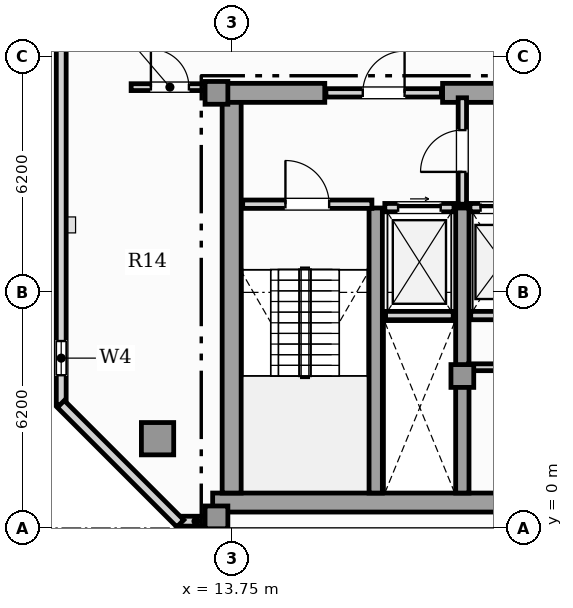
"""IFC4 building model, lengths in metres.
Left out: names, types, materials, properties, quantities, classifications, styles, units other than length and angle.
Written with IfcOpenShell. Run it as: python <this file> out.ifc"""

import sys

from ifc_helpers import new_model, si_unit, direction, frame, frame_2d, origin, origin_2d, place, context, subcontext, project, spatial, rectangle, hollow_rectangle, extrude, element, fill, save


model = new_model("IFC4")
c1 = context("Model", 3, precision=1e-05, world=origin(), true_north=direction((0.0, 1.0)))
c2 = subcontext(c1, "Body", "Model", "MODEL_VIEW")
j1 = project(units=[si_unit("LENGTHUNIT", "METRE"), si_unit("PLANEANGLEUNIT", "RADIAN")], contexts=[c1])
p1 = place(None, origin())
s1 = spatial("IfcSite", under=j1, at=p1, CompositionType="ELEMENT")
p2 = place(p1, origin())
s2 = spatial("IfcBuilding", under=s1, at=p2, CompositionType="ELEMENT")
p3 = place(p2, frame((0.0, 0.0, 324.6)))
s3 = spatial("IfcBuildingStorey", under=s2, at=p3, CompositionType="ELEMENT", Elevation=324.6)
p4 = place(p3, frame((13.25, 0.67, 0.0), z_axis=(0.0, 0.0, 1.0), x_axis=(1.0, 0.0, 0.0)))
e1 = element("IfcWall", 1, at=p4, inside=s3, PredefinedType="SHEAR", context=c2, shape_type="SweptSolid", body=[
    extrude(rectangle(XDim=31.0, YDim=0.5, at=frame_2d((15.5, 0.0))), origin(), (0.0, 0.0, 1.0), 3.65),
])
p5 = place(p3, frame((13.75, 0.92, 0.0), z_axis=(0.0, 0.0, 1.0), x_axis=(0.0, 1.0, 0.0)))
e2 = element("IfcWall", 2, at=p5, inside=s3, PredefinedType="SHEAR", context=c2, shape_type="SweptSolid", body=[
    extrude(rectangle(XDim=10.53, YDim=0.5, at=frame_2d((5.265, 0.0))), origin(), (0.0, 0.0, 1.0), 3.65),
])
p6 = place(p3, frame((13.25, 11.45, 0.0), z_axis=(0.0, 0.0, 1.0), x_axis=(1.0, 0.0, 0.0)))
e3 = element("IfcWall", 3, at=p6, inside=s3, PredefinedType="SHEAR", context=c2, shape_type="SweptSolid", body=[
    extrude(rectangle(XDim=2.95, YDim=0.5, at=frame_2d((1.475, 0.0))), origin(), (0.0, 0.0, 1.0), 3.65),
])
p7 = place(p3, frame((19.3, 11.45, 0.0), z_axis=(0.0, 0.0, 1.0), x_axis=(1.0, 0.0, 0.0)))
e4 = element("IfcWall", 4, at=p7, inside=s3, PredefinedType="SHEAR", context=c2, shape_type="SweptSolid", body=[
    extrude(rectangle(XDim=7.3, YDim=0.5, at=frame_2d((3.65, 0.0))), origin(), (0.0, 0.0, 1.0), 3.65),
])
for number, where, z_axis, x_axis in (
    (5, (17.54, 0.92, 0.0), (0.0, 0.0, 1.0), (0.0, 1.0, 0.0)),
    (6, (19.82, 0.92, 0.0), (0.0, 0.0, 1.0), (0.0, 1.0, 0.0)),
):
    element("IfcWall", number, at=place(p3, frame(where, z_axis=z_axis, x_axis=x_axis)), inside=s3, PredefinedType="SHEAR", context=c2, shape_type="SweptSolid", body=[
        extrude(rectangle(XDim=7.5, YDim=0.35, at=frame_2d((3.75, 0.0))), origin(), (0.0, 0.0, 1.0), 3.65),
    ])
for number, where, z_axis, x_axis in (
    (7, (13.35, 0.28, 0.0), (0.0, 0.0, 1.0), (1.0, 0.0, 0.0)),
    (8, (13.35, 11.45, 0.0), (0.0, 0.0, 1.0), (1.0, 0.0, 0.0)),
    (9, (19.82, 4.0, 0.0), (0.0, 0.0, 1.0), (1.0, 0.0, 0.0)),
):
    element("IfcColumn", number, at=place(p3, frame(where, z_axis=z_axis, x_axis=x_axis)), inside=s3, PredefinedType="COLUMN", context=c2, shape_type="SweptSolid", body=[
        extrude(rectangle(XDim=0.6, YDim=0.6, at=origin_2d()), origin(), (0.0, 0.0, 1.0), 3.85),
    ])
p8 = place(p3, frame((11.8, 2.35, 0.0), z_axis=(0.0, 0.0, 1.0), x_axis=(1.0, 0.0, 0.0)))
e10 = element("IfcColumn", 10, at=p8, inside=s3, PredefinedType="USERDEFINED", context=c2, shape_type="SweptSolid", body=[
    extrude(hollow_rectangle(XDim=0.85, YDim=0.85, WallThickness=0.05, at=origin_2d()), origin(), (0.0, 0.0, 1.0), 3.85),
])
p9 = place(p3, frame((12.375, 0.18, 0.0), z_axis=(0.0, 0.0, 1.0), x_axis=(1.0, 0.0, 0.0)))
e11 = element("IfcWall", 11, at=p9, inside=s3, PredefinedType="SOLIDWALL", context=c2, shape_type="SweptSolid", body=[
    extrude(rectangle(XDim=0.875, YDim=0.26, at=frame_2d((0.438, 0.0))), origin(), (0.0, 0.0, 1.0), 3.65),
])
p10 = place(p3, frame((9.265, 29.231, 0.0), z_axis=(0.0, 0.0, 1.0), x_axis=(0.0, -1.0, 0.0)))
e12 = element("IfcWall", 12, at=p10, inside=s3, PredefinedType="SOLIDWALL", context=c2, shape_type="SweptSolid", body=[
    extrude(rectangle(XDim=25.991, YDim=0.26, at=frame_2d((12.995, 0.0))), origin(), (0.0, 0.0, 1.0), 3.65),
])
p11 = place(p10, frame((24.311, 0.0, 0.95)))
e13 = element("IfcOpeningElement", 13, at=p11, cuts=e12, PredefinedType="OPENING", context=c2, shape_type="SweptSolid", body=[
    extrude(rectangle(XDim=0.9, YDim=1.5, at=frame_2d((0.45, 0.75))), frame((0.0, 0.14, 0.0), z_axis=(0.0, -1.0, 0.0), x_axis=(1.0, 0.0, 0.0)), (0.0, 0.0, 1.0), 0.28),
])
p12 = place(p10, frame((12.846, 0.0, 0.95)))
e14 = element("IfcOpeningElement", 14, at=p12, cuts=e12, PredefinedType="OPENING", context=c2, shape_type="SweptSolid", body=[
    extrude(rectangle(XDim=0.9, YDim=1.5, at=frame_2d((0.45, 0.75))), frame((0.0, 0.14, 0.0), z_axis=(0.0, -1.0, 0.0), x_axis=(1.0, 0.0, 0.0)), (0.0, 0.0, 1.0), 0.28),
])
p13 = place(p10, frame((10.978, 0.0, 0.95)))
e15 = element("IfcOpeningElement", 15, at=p13, cuts=e12, PredefinedType="OPENING", context=c2, shape_type="SweptSolid", body=[
    extrude(rectangle(XDim=0.9, YDim=1.5, at=frame_2d((0.45, 0.75))), frame((0.0, 0.14, 0.0), z_axis=(0.0, -1.0, 0.0), x_axis=(1.0, 0.0, 0.0)), (0.0, 0.0, 1.0), 0.28),
])
p14 = place(p10, frame((8.196, 0.0, 0.9)))
e16 = element("IfcOpeningElement", 16, at=p14, cuts=e12, PredefinedType="OPENING", context=c2, shape_type="SweptSolid", body=[
    extrude(rectangle(XDim=1.5, YDim=1.95, at=frame_2d((0.75, 0.975))), frame((0.0, 0.14, 0.0), z_axis=(0.0, -1.0, 0.0), x_axis=(1.0, 0.0, 0.0)), (0.0, 0.0, 1.0), 0.28),
])
p15 = place(p10, frame((5.138, 0.0, 0.9)))
e17 = element("IfcOpeningElement", 17, at=p15, cuts=e12, PredefinedType="OPENING", context=c2, shape_type="SweptSolid", body=[
    extrude(rectangle(XDim=1.5, YDim=1.95, at=frame_2d((0.75, 0.975))), frame((0.0, 0.14, 0.0), z_axis=(0.0, -1.0, 0.0), x_axis=(1.0, 0.0, 0.0)), (0.0, 0.0, 1.0), 0.28),
])
p16 = place(p10, frame((2.545, 0.0, 0.9)))
e18 = element("IfcOpeningElement", 18, at=p16, cuts=e12, PredefinedType="OPENING", context=c2, shape_type="SweptSolid", body=[
    extrude(rectangle(XDim=1.5, YDim=1.95, at=frame_2d((0.75, 0.975))), frame((0.0, 0.14, 0.0), z_axis=(0.0, -1.0, 0.0), x_axis=(1.0, 0.0, 0.0)), (0.0, 0.0, 1.0), 0.28),
])
p17 = place(p3, frame((9.255, 3.264, 0.0), z_axis=(0.0, 0.0, 1.0), x_axis=(0.707079321262, -0.707134240044, 0.0)))
e19 = element("IfcWall", 19, at=p17, inside=s3, PredefinedType="SOLIDWALL", context=c2, shape_type="SweptSolid", body=[
    extrude(rectangle(XDim=4.446, YDim=0.26, at=frame_2d((2.223, 0.0))), origin(), (0.0, 0.0, 1.0), 3.65),
])
p18 = place(p3, frame((17.8, 5.59, 0.0), z_axis=(0.0, 0.0, 1.0), x_axis=(1.0, 0.0, 0.0)))
e20 = element("IfcWall", 20, at=p18, inside=s3, PredefinedType="SOLIDWALL", context=c2, shape_type="SweptSolid", body=[
    extrude(rectangle(XDim=1.78, YDim=0.22, at=frame_2d((0.89, 0.0))), origin(), (0.0, 0.0, 1.0), 3.65),
])
p19 = place(p3, frame((17.78, 8.43, 0.0), z_axis=(0.0, 0.0, 1.0), x_axis=(1.0, 0.0, 0.0)))
e21 = element("IfcWall", 21, at=p19, inside=s3, PredefinedType="SOLIDWALL", context=c2, shape_type="SweptSolid", body=[
    extrude(rectangle(XDim=1.82, YDim=0.22, at=frame_2d((0.91, 0.0))), origin(), (0.0, 0.0, 1.0), 3.65),
])
p20 = place(p19, frame((0.35, 0.0, 0.0)))
e22 = element("IfcOpeningElement", 22, at=p20, cuts=e21, PredefinedType="OPENING", context=c2, shape_type="SweptSolid", body=[
    extrude(rectangle(XDim=1.12, YDim=2.25, at=frame_2d((0.56, 1.125))), frame((0.0, 0.12, 0.0), z_axis=(0.0, -1.0, 0.0), x_axis=(1.0, 0.0, 0.0)), (0.0, 0.0, 1.0), 0.24),
])
p21 = place(p3, frame((20.04, 5.59, 0.0), z_axis=(0.0, 0.0, 1.0), x_axis=(1.0, 0.0, 0.0)))
e23 = element("IfcWall", 23, at=p21, inside=s3, PredefinedType="SOLIDWALL", context=c2, shape_type="SweptSolid", body=[
    extrude(rectangle(XDim=1.7, YDim=0.22, at=frame_2d((0.85, 0.0))), origin(), (0.0, 0.0, 1.0), 3.65),
])
p22 = place(p3, frame((20.02, 8.43, 0.0), z_axis=(0.0, 0.0, 1.0), x_axis=(1.0, 0.0, 0.0)))
e24 = element("IfcWall", 24, at=p22, inside=s3, PredefinedType="SOLIDWALL", context=c2, shape_type="SweptSolid", body=[
    extrude(rectangle(XDim=1.74, YDim=0.22, at=frame_2d((0.87, 0.0))), origin(), (0.0, 0.0, 1.0), 3.65),
])
p23 = place(p22, frame((0.28, 0.0, 0.0)))
e25 = element("IfcOpeningElement", 25, at=p23, cuts=e24, PredefinedType="OPENING", context=c2, shape_type="SweptSolid", body=[
    extrude(rectangle(XDim=1.18, YDim=2.2, at=frame_2d((0.59, 1.1))), frame((0.0, 0.12, 0.0), z_axis=(0.0, -1.0, 0.0), x_axis=(1.0, 0.0, 0.0)), (0.0, 0.0, 1.0), 0.24),
])
p24 = place(p3, frame((14.04, 8.52, 0.0), z_axis=(0.0, 0.0, 1.0), x_axis=(1.0, 0.0, 0.0)))
e26 = element("IfcWall", 26, at=p24, inside=s3, PredefinedType="SOLIDWALL", context=c2, shape_type="SweptSolid", body=[
    extrude(rectangle(XDim=3.4, YDim=0.22, at=frame_2d((1.7, 0.0))), origin(), (0.0, 0.0, 1.0), 3.65),
])
p25 = place(p24, frame((1.125, 0.0, 0.0)))
e27 = element("IfcOpeningElement", 27, at=p25, cuts=e26, PredefinedType="OPENING", context=c2, shape_type="SweptSolid", body=[
    extrude(rectangle(XDim=1.15, YDim=2.2, at=frame_2d((0.575, 1.1))), frame((0.0, 0.12, 0.0), z_axis=(0.0, -1.0, 0.0), x_axis=(1.0, 0.0, 0.0)), (0.0, 0.0, 1.0), 0.24),
])
p26 = place(p3, frame((19.82, 8.52, 0.0), z_axis=(0.0, 0.0, 1.0), x_axis=(0.0, 1.0, 0.0)))
e28 = element("IfcWall", 28, at=p26, inside=s3, PredefinedType="SOLIDWALL", context=c2, shape_type="SweptSolid", body=[
    extrude(rectangle(XDim=2.8, YDim=0.22, at=frame_2d((1.4, 0.0))), origin(), (0.0, 0.0, 1.0), 3.105),
])
p27 = place(p26, frame((0.85, 0.0, 0.0)))
e29 = element("IfcOpeningElement", 29, at=p27, cuts=e28, PredefinedType="OPENING", context=c2, shape_type="SweptSolid", body=[
    extrude(rectangle(XDim=1.1, YDim=2.2, at=frame_2d((0.55, 1.1))), frame((0.0, 0.12, 0.0), z_axis=(0.0, -1.0, 0.0), x_axis=(1.0, 0.0, 0.0)), (0.0, 0.0, 1.0), 0.24),
])
p28 = place(p3, frame((16.23, 11.45, 0.0), z_axis=(0.0, 0.0, 1.0), x_axis=(1.0, 0.0, 0.0)))
e30 = element("IfcWall", 30, at=p28, inside=s3, PredefinedType="SOLIDWALL", context=c2, shape_type="SweptSolid", body=[
    extrude(rectangle(XDim=3.04, YDim=0.22, at=frame_2d((1.52, 0.0))), origin(), (0.0, 0.0, 1.0), 3.65),
])
p29 = place(p28, frame((0.97, 0.0, 0.0)))
e31 = element("IfcOpeningElement", 31, at=p29, cuts=e30, PredefinedType="OPENING", context=c2, shape_type="SweptSolid", body=[
    extrude(rectangle(XDim=1.1, YDim=2.2, at=frame_2d((0.55, 1.1))), frame((0.0, 0.12, 0.0), z_axis=(0.0, -1.0, 0.0), x_axis=(1.0, 0.0, 0.0)), (0.0, 0.0, 1.0), 0.24),
])
p30 = place(p3, frame((19.98, 4.23, 0.0), z_axis=(0.0, 0.0, 1.0), x_axis=(1.0, 0.0, 0.0)))
e32 = element("IfcWall", 32, at=p30, inside=s3, PredefinedType="PARTITIONING", context=c2, shape_type="SweptSolid", body=[
    extrude(rectangle(XDim=5.32, YDim=0.18, at=frame_2d((2.66, 0.0))), origin(), (0.0, 0.0, 1.0), 3.65),
])
p31 = place(p3, frame((11.105, 11.6, 0.0), z_axis=(0.0, 0.0, 1.0), x_axis=(1.0, 0.0, 0.0)))
e33 = element("IfcWall", 33, at=p31, inside=s3, PredefinedType="PARTITIONING", context=c2, shape_type="SweptSolid", body=[
    extrude(rectangle(XDim=2.04, YDim=0.18, at=frame_2d((1.02, 0.0))), origin(), (0.0, 0.0, 1.0), 3.65),
])
p32 = place(p31, frame((0.52, 0.0, 0.0)))
e34 = element("IfcOpeningElement", 34, at=p32, cuts=e33, PredefinedType="OPENING", context=c2, shape_type="SweptSolid", body=[
    extrude(rectangle(XDim=1.0, YDim=2.15, at=frame_2d((0.5, 1.075))), frame((0.0, 0.1, 0.0), z_axis=(0.0, -1.0, 0.0), x_axis=(1.0, 0.0, 0.0)), (0.0, 0.0, 1.0), 0.2),
])
p33 = place(p11, origin())
e35 = element("IfcWindow", 35, at=p33, inside=s3, PartitioningType="SINGLE_PANEL", PredefinedType="WINDOW", context=c2, shape_type="SweptSolid", body=[
    extrude(rectangle(XDim=0.9, YDim=1.5, at=frame_2d((0.45, 0.75))), frame((0.0, 0.03, 0.0), z_axis=(0.0, -1.0, 0.0), x_axis=(1.0, 0.0, 0.0)), (0.0, 0.0, 1.0), 0.06),
])
fill(e13, e35)
p34 = place(p20, origin())
e36 = element("IfcDoor", 36, at=p34, inside=s3, OperationType="SLIDING_TO_RIGHT", PredefinedType="DOOR", context=c2, shape_type="SweptSolid", body=[
    extrude(rectangle(XDim=1.12, YDim=2.25, at=frame_2d((0.56, 1.125))), frame((0.0, 0.025, 0.0), z_axis=(0.0, -1.0, 0.0), x_axis=(1.0, 0.0, 0.0)), (0.0, 0.0, 1.0), 0.05),
])
fill(e22, e36)
p35 = place(p23, origin())
e37 = element("IfcDoor", 37, at=p35, inside=s3, OperationType="SLIDING_TO_LEFT", PredefinedType="DOOR", context=c2, shape_type="SweptSolid", body=[
    extrude(rectangle(XDim=1.18, YDim=2.2, at=frame_2d((0.59, 1.1))), frame((0.0, 0.025, 0.0), z_axis=(0.0, -1.0, 0.0), x_axis=(1.0, 0.0, 0.0)), (0.0, 0.0, 1.0), 0.05),
])
fill(e25, e37)
p36 = place(p25, origin())
e38 = element("IfcDoor", 38, at=p36, inside=s3, OperationType="SINGLE_SWING_LEFT", PredefinedType="DOOR", context=c2, shape_type="SweptSolid", body=[
    extrude(rectangle(XDim=1.15, YDim=2.2, at=frame_2d((0.575, 1.1))), frame((0.0, 0.025, 0.0), z_axis=(0.0, -1.0, 0.0), x_axis=(1.0, 0.0, 0.0)), (0.0, 0.0, 1.0), 0.05),
])
fill(e27, e38)
p37 = place(p27, origin())
e39 = element("IfcDoor", 39, at=p37, inside=s3, OperationType="SINGLE_SWING_LEFT", PredefinedType="DOOR", context=c2, shape_type="SweptSolid", body=[
    extrude(rectangle(XDim=1.1, YDim=2.2, at=frame_2d((0.55, 1.1))), frame((0.0, 0.025, 0.0), z_axis=(0.0, -1.0, 0.0), x_axis=(1.0, 0.0, 0.0)), (0.0, 0.0, 1.0), 0.05),
])
fill(e29, e39)
p38 = place(p29, origin())
e40 = element("IfcDoor", 40, at=p38, inside=s3, OperationType="SINGLE_SWING_RIGHT", PredefinedType="DOOR", context=c2, shape_type="SweptSolid", body=[
    extrude(rectangle(XDim=1.1, YDim=2.2, at=frame_2d((0.55, 1.1))), frame((0.0, 0.025, 0.0), z_axis=(0.0, -1.0, 0.0), x_axis=(1.0, 0.0, 0.0)), (0.0, 0.0, 1.0), 0.05),
])
fill(e31, e40)
p39 = place(p32, origin())
e41 = element("IfcDoor", 41, at=p39, inside=s3, OperationType="SINGLE_SWING_LEFT", PredefinedType="DOOR", context=c2, shape_type="SweptSolid", body=[
    extrude(rectangle(XDim=1.0, YDim=2.15, at=frame_2d((0.5, 1.075))), frame((0.0, 0.025, 0.0), z_axis=(0.0, -1.0, 0.0), x_axis=(1.0, 0.0, 0.0)), (0.0, 0.0, 1.0), 0.05),
])
fill(e34, e41)
save(model, sys.argv[1])
